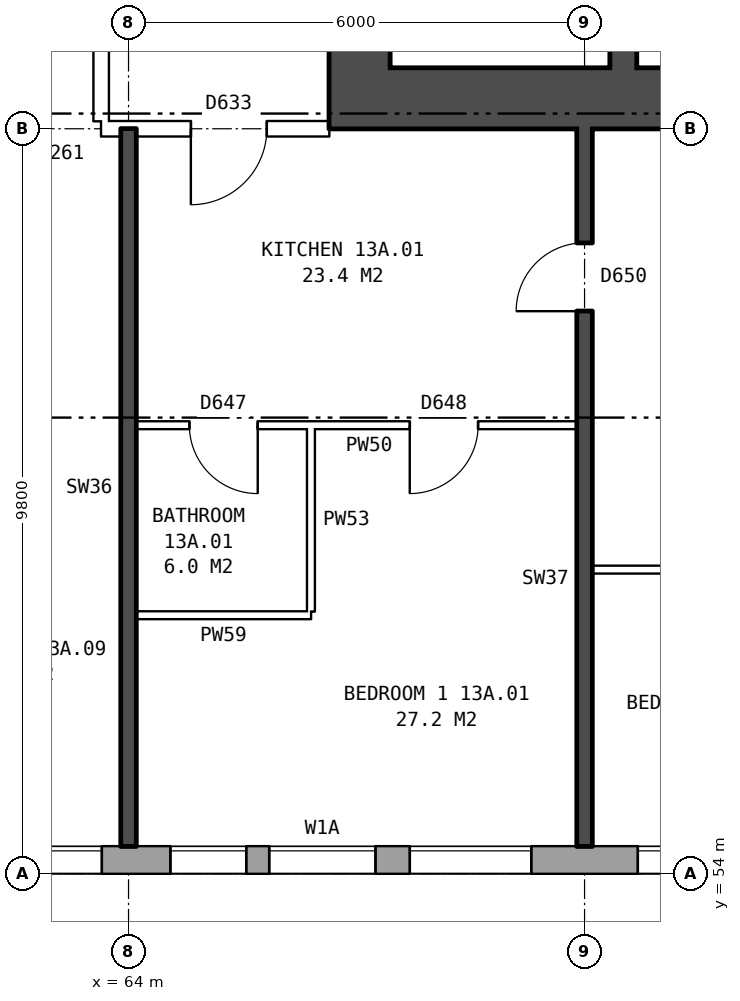
"""IFC4 building model, lengths in metres.
Left out: names, types, materials, properties, quantities, classifications, styles, units other than length and angle.
Written with IfcOpenShell. Run it as: python <this file> out.ifc"""

import sys

from ifc_helpers import new_model, si_unit, direction, frame, frame_2d, origin, place, context, subcontext, project, spatial, rectangle, extrude, element, fill, save


model = new_model("IFC4")
c1 = context("Model", 3, precision=1e-05, world=origin(), true_north=direction((0.0, 1.0)))
c2 = subcontext(c1, "Body", "Model", "MODEL_VIEW")
j1 = project(units=[si_unit("LENGTHUNIT", "METRE"), si_unit("PLANEANGLEUNIT", "RADIAN")], contexts=[c1])
p1 = place(None, origin())
s1 = spatial("IfcSite", under=j1, at=p1, CompositionType="ELEMENT")
p2 = place(p1, origin())
s2 = spatial("IfcBuilding", under=s1, at=p2, CompositionType="ELEMENT")
p3 = place(p2, frame((0.0, 0.0, 50.5)))
s3 = spatial("IfcBuildingStorey", under=s2, at=p3, CompositionType="ELEMENT", Elevation=50.5)
p4 = place(p3, frame((24.575, 54.18, 0.0), z_axis=(0.0, 0.0, 1.0), x_axis=(1.0, 0.0, 0.0)))
e1 = element("IfcWall", 1, at=p4, inside=s3, PredefinedType="STANDARD", context=c2, shape_type="SweptSolid", body=[
    extrude(rectangle(XDim=48.351, YDim=0.36, at=frame_2d((24.175, 0.0))), origin(), (0.0, 0.0, 1.0), 2.85),
])
p5 = place(p4, frame((1.125, 0.0, 0.8)))
e2 = element("IfcOpeningElement", 2, at=p5, cuts=e1, PredefinedType="OPENING", context=c2, shape_type="SweptSolid", body=[
    extrude(rectangle(XDim=1.6, YDim=1.8, at=frame_2d((0.8, 0.9))), frame((0.0, 0.19, 0.0), z_axis=(0.0, -1.0, 0.0), x_axis=(1.0, 0.0, 0.0)), (0.0, 0.0, 1.0), 0.38),
])
p6 = place(p4, frame((4.125, 0.0, 0.8)))
e3 = element("IfcOpeningElement", 3, at=p6, cuts=e1, PredefinedType="OPENING", context=c2, shape_type="SweptSolid", body=[
    extrude(rectangle(XDim=1.6, YDim=1.8, at=frame_2d((0.8, 0.9))), frame((0.0, 0.19, 0.0), z_axis=(0.0, -1.0, 0.0), x_axis=(1.0, 0.0, 0.0)), (0.0, 0.0, 1.0), 0.38),
])
p7 = place(p4, frame((6.025, 0.0, 0.8)))
e4 = element("IfcOpeningElement", 4, at=p7, cuts=e1, PredefinedType="OPENING", context=c2, shape_type="SweptSolid", body=[
    extrude(rectangle(XDim=1.0, YDim=1.8, at=frame_2d((0.5, 0.9))), frame((0.0, 0.19, 0.0), z_axis=(0.0, -1.0, 0.0), x_axis=(1.0, 0.0, 0.0)), (0.0, 0.0, 1.0), 0.38),
])
p8 = place(p4, frame((9.775, 0.0, 0.8)))
e5 = element("IfcOpeningElement", 5, at=p8, cuts=e1, PredefinedType="OPENING", context=c2, shape_type="SweptSolid", body=[
    extrude(rectangle(XDim=1.0, YDim=0.9, at=frame_2d((0.5, 0.45))), frame((0.0, 0.19, 0.0), z_axis=(0.0, -1.0, 0.0), x_axis=(1.0, 0.0, 0.0)), (0.0, 0.0, 1.0), 0.38),
])
p9 = place(p4, frame((13.125, 0.0, 0.8)))
e6 = element("IfcOpeningElement", 6, at=p9, cuts=e1, PredefinedType="OPENING", context=c2, shape_type="SweptSolid", body=[
    extrude(rectangle(XDim=1.6, YDim=1.8, at=frame_2d((0.8, 0.9))), frame((0.0, 0.19, 0.0), z_axis=(0.0, -1.0, 0.0), x_axis=(1.0, 0.0, 0.0)), (0.0, 0.0, 1.0), 0.38),
])
p10 = place(p4, frame((16.125, 0.0, 0.8)))
e7 = element("IfcOpeningElement", 7, at=p10, cuts=e1, PredefinedType="OPENING", context=c2, shape_type="SweptSolid", body=[
    extrude(rectangle(XDim=1.6, YDim=1.8, at=frame_2d((0.8, 0.9))), frame((0.0, 0.19, 0.0), z_axis=(0.0, -1.0, 0.0), x_axis=(1.0, 0.0, 0.0)), (0.0, 0.0, 1.0), 0.38),
])
p11 = place(p4, frame((19.125, 0.0, 0.8)))
e8 = element("IfcOpeningElement", 8, at=p11, cuts=e1, PredefinedType="OPENING", context=c2, shape_type="SweptSolid", body=[
    extrude(rectangle(XDim=1.6, YDim=1.8, at=frame_2d((0.8, 0.9))), frame((0.0, 0.19, 0.0), z_axis=(0.0, -1.0, 0.0), x_axis=(1.0, 0.0, 0.0)), (0.0, 0.0, 1.0), 0.38),
])
p12 = place(p4, frame((22.125, 0.0, 0.8)))
e9 = element("IfcOpeningElement", 9, at=p12, cuts=e1, PredefinedType="OPENING", context=c2, shape_type="SweptSolid", body=[
    extrude(rectangle(XDim=1.6, YDim=1.8, at=frame_2d((0.8, 0.9))), frame((0.0, 0.19, 0.0), z_axis=(0.0, -1.0, 0.0), x_axis=(1.0, 0.0, 0.0)), (0.0, 0.0, 1.0), 0.38),
])
p13 = place(p4, frame((25.125, 0.0, 0.8)))
e10 = element("IfcOpeningElement", 10, at=p13, cuts=e1, PredefinedType="OPENING", context=c2, shape_type="SweptSolid", body=[
    extrude(rectangle(XDim=1.6, YDim=1.8, at=frame_2d((0.8, 0.9))), frame((0.0, 0.19, 0.0), z_axis=(0.0, -1.0, 0.0), x_axis=(1.0, 0.0, 0.0)), (0.0, 0.0, 1.0), 0.38),
])
p14 = place(p4, frame((28.125, 0.0, 0.8)))
e11 = element("IfcOpeningElement", 11, at=p14, cuts=e1, PredefinedType="OPENING", context=c2, shape_type="SweptSolid", body=[
    extrude(rectangle(XDim=1.6, YDim=1.8, at=frame_2d((0.8, 0.9))), frame((0.0, 0.19, 0.0), z_axis=(0.0, -1.0, 0.0), x_axis=(1.0, 0.0, 0.0)), (0.0, 0.0, 1.0), 0.38),
])
p15 = place(p4, frame((31.125, 0.0, 0.8)))
e12 = element("IfcOpeningElement", 12, at=p15, cuts=e1, PredefinedType="OPENING", context=c2, shape_type="SweptSolid", body=[
    extrude(rectangle(XDim=1.6, YDim=1.8, at=frame_2d((0.8, 0.9))), frame((0.0, 0.19, 0.0), z_axis=(0.0, -1.0, 0.0), x_axis=(1.0, 0.0, 0.0)), (0.0, 0.0, 1.0), 0.38),
])
p16 = place(p4, frame((34.125, 0.0, 0.8)))
e13 = element("IfcOpeningElement", 13, at=p16, cuts=e1, PredefinedType="OPENING", context=c2, shape_type="SweptSolid", body=[
    extrude(rectangle(XDim=1.6, YDim=1.8, at=frame_2d((0.8, 0.9))), frame((0.0, 0.19, 0.0), z_axis=(0.0, -1.0, 0.0), x_axis=(1.0, 0.0, 0.0)), (0.0, 0.0, 1.0), 0.38),
])
p17 = place(p4, frame((36.575, 0.0, 0.45)))
e14 = element("IfcOpeningElement", 14, at=p17, cuts=e1, PredefinedType="OPENING", context=c2, shape_type="SweptSolid", body=[
    extrude(rectangle(XDim=1.2, YDim=1.8, at=frame_2d((0.6, 0.9))), frame((0.0, 0.19, 0.0), z_axis=(0.0, -1.0, 0.0), x_axis=(1.0, 0.0, 0.0)), (0.0, 0.0, 1.0), 0.38),
])
p18 = place(p4, frame((39.975, 0.0, 1.7)))
e15 = element("IfcOpeningElement", 15, at=p18, cuts=e1, PredefinedType="OPENING", context=c2, shape_type="SweptSolid", body=[
    extrude(rectangle(XDim=1.0, YDim=0.9, at=frame_2d((0.5, 0.45))), frame((0.0, 0.19, 0.0), z_axis=(0.0, -1.0, 0.0), x_axis=(1.0, 0.0, 0.0)), (0.0, 0.0, 1.0), 0.38),
])
p19 = place(p4, frame((43.125, 0.0, 0.8)))
e16 = element("IfcOpeningElement", 16, at=p19, cuts=e1, PredefinedType="OPENING", context=c2, shape_type="SweptSolid", body=[
    extrude(rectangle(XDim=1.6, YDim=1.8, at=frame_2d((0.8, 0.9))), frame((0.0, 0.19, 0.0), z_axis=(0.0, -1.0, 0.0), x_axis=(1.0, 0.0, 0.0)), (0.0, 0.0, 1.0), 0.38),
])
p20 = place(p4, frame((46.125, 0.0, 0.8)))
e17 = element("IfcOpeningElement", 17, at=p20, cuts=e1, PredefinedType="OPENING", context=c2, shape_type="SweptSolid", body=[
    extrude(rectangle(XDim=1.6, YDim=1.8, at=frame_2d((0.8, 0.9))), frame((0.0, 0.19, 0.0), z_axis=(0.0, -1.0, 0.0), x_axis=(1.0, 0.0, 0.0)), (0.0, 0.0, 1.0), 0.38),
])
p21 = place(p4, frame((7.325, 0.0, 1.7)))
e18 = element("IfcOpeningElement", 18, at=p21, cuts=e1, PredefinedType="OPENING", context=c2, shape_type="SweptSolid", body=[
    extrude(rectangle(XDim=1.0, YDim=0.9, at=frame_2d((0.5, 0.45))), frame((0.0, 0.19, 0.0), z_axis=(0.0, -1.0, 0.0), x_axis=(1.0, 0.0, 0.0)), (0.0, 0.0, 1.0), 0.38),
])
p22 = place(p4, frame((11.075, 0.0, 0.8)))
e19 = element("IfcOpeningElement", 19, at=p22, cuts=e1, PredefinedType="OPENING", context=c2, shape_type="SweptSolid", body=[
    extrude(rectangle(XDim=1.0, YDim=1.8, at=frame_2d((0.5, 0.9))), frame((0.0, 0.19, 0.0), z_axis=(0.0, -1.0, 0.0), x_axis=(1.0, 0.0, 0.0)), (0.0, 0.0, 1.0), 0.38),
])
p23 = place(p4, frame((38.075, 0.0, 0.45)))
e20 = element("IfcOpeningElement", 20, at=p23, cuts=e1, PredefinedType="OPENING", context=c2, shape_type="SweptSolid", body=[
    extrude(rectangle(XDim=1.0, YDim=0.9, at=frame_2d((0.5, 0.45))), frame((0.0, 0.19, 0.0), z_axis=(0.0, -1.0, 0.0), x_axis=(1.0, 0.0, 0.0)), (0.0, 0.0, 1.0), 0.38),
])
p24 = place(p4, frame((41.275, 0.0, 0.8)))
e21 = element("IfcOpeningElement", 21, at=p24, cuts=e1, PredefinedType="OPENING", context=c2, shape_type="SweptSolid", body=[
    extrude(rectangle(XDim=1.4, YDim=1.8, at=frame_2d((0.7, 0.9))), frame((0.0, 0.19, 0.0), z_axis=(0.0, -1.0, 0.0), x_axis=(1.0, 0.0, 0.0)), (0.0, 0.0, 1.0), 0.38),
])
p25 = place(p3, frame((67.04, 64.6, 0.0), z_axis=(0.0, 0.0, 1.0), x_axis=(0.0, 1.0, 0.0)))
e22 = element("IfcWall", 22, at=p25, inside=s3, PredefinedType="SHEAR", context=c2, shape_type="SweptSolid", body=[
    extrude(rectangle(XDim=10.8, YDim=0.8, at=frame_2d((5.4, 0.0))), origin(), (0.0, 0.0, 1.0), 2.85),
])
p26 = place(p25, frame((0.525, 0.0, 0.0)))
e23 = element("IfcOpeningElement", 23, at=p26, cuts=e22, PredefinedType="OPENING", context=c2, shape_type="SweptSolid", body=[
    extrude(rectangle(XDim=1.1, YDim=2.1, at=frame_2d((0.55, 1.05))), frame((0.0, 0.41, 0.0), z_axis=(0.0, -1.0, 0.0), x_axis=(1.0, 0.0, 0.0)), (0.0, 0.0, 1.0), 0.82),
])
p27 = place(p25, frame((9.1, 0.0, 0.0)))
e24 = element("IfcOpeningElement", 24, at=p27, cuts=e22, PredefinedType="OPENING", context=c2, shape_type="SweptSolid", body=[
    extrude(rectangle(XDim=1.1, YDim=2.1, at=frame_2d((0.55, 1.05))), frame((0.0, 0.41, 0.0), z_axis=(0.0, -1.0, 0.0), x_axis=(1.0, 0.0, 0.0)), (0.0, 0.0, 1.0), 0.82),
])
p28 = place(p3, frame((66.64, 64.2, 0.0), z_axis=(0.0, 0.0, 1.0), x_axis=(1.0, 0.0, 0.0)))
e25 = element("IfcWall", 25, at=p28, inside=s3, PredefinedType="SHEAR", context=c2, shape_type="SweptSolid", body=[
    extrude(rectangle(XDim=9.0, YDim=0.8, at=frame_2d((4.5, 0.0))), origin(), (0.0, 0.0, 1.0), 2.85),
])
p29 = place(p3, frame((70.51, 64.6, 0.0), z_axis=(0.0, 0.0, 1.0), x_axis=(0.0, 1.0, 0.0)))
e26 = element("IfcWall", 26, at=p29, inside=s3, PredefinedType="SHEAR", context=c2, shape_type="SweptSolid", body=[
    extrude(rectangle(XDim=2.075, YDim=0.35, at=frame_2d((1.038, 0.0))), origin(), (0.0, 0.0, 1.0), 2.85),
])
p30 = place(p3, frame((63.64, 63.9, 0.0), z_axis=(0.0, 0.0, 1.0), x_axis=(0.0, 1.0, 0.0)))
e27 = element("IfcWall", 27, at=p30, inside=s3, PredefinedType="PARTITIONING", context=c2, shape_type="SweptSolid", body=[
    extrude(rectangle(XDim=12.2, YDim=0.2, at=frame_2d((6.1, 0.0))), origin(), (0.0, 0.0, 1.0), 2.85),
])
p31 = place(p30, frame((5.1, 0.0, 0.0)))
e28 = element("IfcOpeningElement", 28, at=p31, cuts=e27, PredefinedType="OPENING", context=c2, shape_type="SweptSolid", body=[
    extrude(rectangle(XDim=2.0, YDim=2.1, at=frame_2d((1.0, 1.05))), frame((0.0, 0.11, 0.0), z_axis=(0.0, -1.0, 0.0), x_axis=(1.0, 0.0, 0.0)), (0.0, 0.0, 1.0), 0.22),
])
p32 = place(p3, frame((64.1, 57.4, 0.0), z_axis=(0.0, 0.0, 1.0), x_axis=(1.0, 0.0, 0.0)))
e29 = element("IfcWall", 29, at=p32, inside=s3, PredefinedType="PARTITIONING", context=c2, shape_type="SweptSolid", body=[
    extrude(rectangle(XDim=2.3, YDim=0.1, at=frame_2d((1.15, 0.0))), origin(), (0.0, 0.0, 1.0), 2.85),
])
p33 = place(p3, frame((70.1, 58.0, 0.0), z_axis=(0.0, 0.0, 1.0), x_axis=(1.0, 0.0, 0.0)))
e30 = element("IfcWall", 30, at=p33, inside=s3, PredefinedType="PARTITIONING", context=c2, shape_type="SweptSolid", body=[
    extrude(rectangle(XDim=5.54, YDim=0.1, at=frame_2d((2.77, 0.0))), origin(), (0.0, 0.0, 1.0), 2.85),
])
p34 = place(p33, frame((2.32, 0.0, 0.0)))
e31 = element("IfcOpeningElement", 31, at=p34, cuts=e30, PredefinedType="OPENING", context=c2, shape_type="SweptSolid", body=[
    extrude(rectangle(XDim=0.9, YDim=2.1, at=frame_2d((0.45, 1.05))), frame((0.0, 0.06, 0.0), z_axis=(0.0, -1.0, 0.0), x_axis=(1.0, 0.0, 0.0)), (0.0, 0.0, 1.0), 0.12),
])
p35 = place(p3, frame((64.1, 59.9, 0.0), z_axis=(0.0, 0.0, 1.0), x_axis=(1.0, 0.0, 0.0)))
e32 = element("IfcWall", 32, at=p35, inside=s3, PredefinedType="PARTITIONING", context=c2, shape_type="SweptSolid", body=[
    extrude(rectangle(XDim=5.8, YDim=0.1, at=frame_2d((2.9, 0.0))), origin(), (0.0, 0.0, 1.0), 2.85),
])
p36 = place(p35, frame((3.6, 0.0, 0.0)))
e33 = element("IfcOpeningElement", 33, at=p36, cuts=e32, PredefinedType="OPENING", context=c2, shape_type="SweptSolid", body=[
    extrude(rectangle(XDim=0.9, YDim=2.1, at=frame_2d((0.45, 1.05))), frame((0.0, 0.06, 0.0), z_axis=(0.0, -1.0, 0.0), x_axis=(1.0, 0.0, 0.0)), (0.0, 0.0, 1.0), 0.12),
])
p37 = place(p35, frame((0.7, 0.0, 0.0)))
e34 = element("IfcOpeningElement", 34, at=p37, cuts=e32, PredefinedType="OPENING", context=c2, shape_type="SweptSolid", body=[
    extrude(rectangle(XDim=0.9, YDim=2.1, at=frame_2d((0.45, 1.05))), frame((0.0, 0.06, 0.0), z_axis=(0.0, -1.0, 0.0), x_axis=(1.0, 0.0, 0.0)), (0.0, 0.0, 1.0), 0.12),
])
p38 = place(p3, frame((63.64, 63.8, 0.0), z_axis=(0.0, 0.0, 1.0), x_axis=(1.0, 0.0, 0.0)))
e35 = element("IfcWall", 35, at=p38, inside=s3, PredefinedType="PARTITIONING", context=c2, shape_type="SweptSolid", body=[
    extrude(rectangle(XDim=3.0, YDim=0.2, at=frame_2d((1.5, 0.0))), origin(), (0.0, 0.0, 1.0), 2.85),
])
p39 = place(p38, frame((1.18, 0.0, 0.0)))
e36 = element("IfcOpeningElement", 36, at=p39, cuts=e35, PredefinedType="OPENING", context=c2, shape_type="SweptSolid", body=[
    extrude(rectangle(XDim=1.0, YDim=2.1, at=frame_2d((0.5, 1.05))), frame((0.0, 0.11, 0.0), z_axis=(0.0, -1.0, 0.0), x_axis=(1.0, 0.0, 0.0)), (0.0, 0.0, 1.0), 0.22),
])
p40 = place(p3, frame((64.0, 54.36, 0.0), z_axis=(0.0, 0.0, 1.0), x_axis=(0.0, 1.0, 0.0)))
e37 = element("IfcWall", 37, at=p40, inside=s3, PredefinedType="SOLIDWALL", context=c2, shape_type="SweptSolid", body=[
    extrude(rectangle(XDim=9.44, YDim=0.2, at=frame_2d((4.72, 0.0))), origin(), (0.0, 0.0, 1.0), 2.85),
])
p41 = place(p3, frame((66.4, 57.45, 0.0), z_axis=(0.0, 0.0, 1.0), x_axis=(0.0, 1.0, 0.0)))
e38 = element("IfcWall", 38, at=p41, inside=s3, PredefinedType="PARTITIONING", context=c2, shape_type="SweptSolid", body=[
    extrude(rectangle(XDim=2.4, YDim=0.1, at=frame_2d((1.2, 0.0))), origin(), (0.0, 0.0, 1.0), 2.85),
])
p42 = place(p3, frame((70.0, 54.36, 0.0), z_axis=(0.0, 0.0, 1.0), x_axis=(0.0, 1.0, 0.0)))
e39 = element("IfcWall", 39, at=p42, inside=s3, PredefinedType="SOLIDWALL", context=c2, shape_type="SweptSolid", body=[
    extrude(rectangle(XDim=9.44, YDim=0.2, at=frame_2d((4.72, 0.0))), origin(), (0.0, 0.0, 1.0), 2.85),
])
p43 = place(p42, frame((7.04, 0.0, 0.0)))
e40 = element("IfcOpeningElement", 40, at=p43, cuts=e39, PredefinedType="OPENING", context=c2, shape_type="SweptSolid", body=[
    extrude(rectangle(XDim=0.9, YDim=2.1, at=frame_2d((0.45, 1.05))), frame((0.0, 0.11, 0.0), z_axis=(0.0, -1.0, 0.0), x_axis=(1.0, 0.0, 0.0)), (0.0, 0.0, 1.0), 0.22),
])
p44 = place(p18, origin())
e41 = element("IfcWindow", 41, at=p44, inside=s3, PartitioningType="SINGLE_PANEL", PredefinedType="WINDOW", context=c2, shape_type="SweptSolid", body=[
    extrude(rectangle(XDim=1.0, YDim=0.9, at=frame_2d((0.5, 0.45))), frame((0.0, 0.15, 0.0), z_axis=(0.0, -1.0, 0.0), x_axis=(1.0, 0.0, 0.0)), (0.0, 0.0, 1.0), 0.06),
])
fill(e15, e41)
p45 = place(p19, origin())
e42 = element("IfcWindow", 42, at=p45, inside=s3, PartitioningType="SINGLE_PANEL", PredefinedType="WINDOW", context=c2, shape_type="SweptSolid", body=[
    extrude(rectangle(XDim=1.6, YDim=1.8, at=frame_2d((0.8, 0.9))), frame((0.0, 0.15, 0.0), z_axis=(0.0, -1.0, 0.0), x_axis=(1.0, 0.0, 0.0)), (0.0, 0.0, 1.0), 0.06),
])
fill(e16, e42)
p46 = place(p20, origin())
e43 = element("IfcWindow", 43, at=p46, inside=s3, PartitioningType="SINGLE_PANEL", PredefinedType="WINDOW", context=c2, shape_type="SweptSolid", body=[
    extrude(rectangle(XDim=1.6, YDim=1.8, at=frame_2d((0.8, 0.9))), frame((0.0, 0.15, 0.0), z_axis=(0.0, -1.0, 0.0), x_axis=(1.0, 0.0, 0.0)), (0.0, 0.0, 1.0), 0.06),
])
fill(e17, e43)
p47 = place(p36, frame((0.9, 0.0, 0.0), z_axis=(0.0, 0.0, 1.0), x_axis=(-1.0, 0.0, 0.0)))
e44 = element("IfcDoor", 44, at=p47, inside=s3, OperationType="SINGLE_SWING_RIGHT", PredefinedType="DOOR", context=c2, shape_type="SweptSolid", body=[
    extrude(rectangle(XDim=0.9, YDim=2.1, at=frame_2d((0.45, 1.05))), frame((0.0, 0.025, 0.0), z_axis=(0.0, -1.0, 0.0), x_axis=(1.0, 0.0, 0.0)), (0.0, 0.0, 1.0), 0.05),
])
fill(e33, e44)
p48 = place(p39, frame((1.0, 0.0, 0.0), z_axis=(0.0, 0.0, 1.0), x_axis=(-1.0, 0.0, 0.0)))
e45 = element("IfcDoor", 45, at=p48, inside=s3, OperationType="SINGLE_SWING_RIGHT", PredefinedType="DOOR", context=c2, shape_type="SweptSolid", body=[
    extrude(rectangle(XDim=1.0, YDim=2.1, at=frame_2d((0.5, 1.05))), frame((0.0, 0.025, 0.0), z_axis=(0.0, -1.0, 0.0), x_axis=(1.0, 0.0, 0.0)), (0.0, 0.0, 1.0), 0.05),
])
fill(e36, e45)
p49 = place(p43, origin())
e46 = element("IfcDoor", 46, at=p49, inside=s3, OperationType="SINGLE_SWING_LEFT", PredefinedType="DOOR", context=c2, shape_type="SweptSolid", body=[
    extrude(rectangle(XDim=0.9, YDim=2.1, at=frame_2d((0.45, 1.05))), frame((0.0, 0.025, 0.0), z_axis=(0.0, -1.0, 0.0), x_axis=(1.0, 0.0, 0.0)), (0.0, 0.0, 1.0), 0.05),
])
fill(e40, e46)
p50 = place(p37, frame((0.9, 0.0, 0.0), z_axis=(0.0, 0.0, 1.0), x_axis=(-1.0, 0.0, 0.0)))
e47 = element("IfcDoor", 47, at=p50, inside=s3, OperationType="SINGLE_SWING_LEFT", PredefinedType="DOOR", context=c2, shape_type="SweptSolid", body=[
    extrude(rectangle(XDim=0.9, YDim=2.1, at=frame_2d((0.45, 1.05))), frame((0.0, 0.025, 0.0), z_axis=(0.0, -1.0, 0.0), x_axis=(1.0, 0.0, 0.0)), (0.0, 0.0, 1.0), 0.05),
])
fill(e34, e47)
p51 = place(p23, origin())
e48 = element("IfcWindow", 48, at=p51, inside=s3, PartitioningType="SINGLE_PANEL", PredefinedType="WINDOW", context=c2, shape_type="SweptSolid", body=[
    extrude(rectangle(XDim=1.0, YDim=0.9, at=frame_2d((0.5, 0.45))), frame((0.0, 0.15, 0.0), z_axis=(0.0, -1.0, 0.0), x_axis=(1.0, 0.0, 0.0)), (0.0, 0.0, 1.0), 0.06),
])
fill(e20, e48)
p52 = place(p24, origin())
e49 = element("IfcWindow", 49, at=p52, inside=s3, PartitioningType="SINGLE_PANEL", PredefinedType="WINDOW", context=c2, shape_type="SweptSolid", body=[
    extrude(rectangle(XDim=1.4, YDim=1.8, at=frame_2d((0.7, 0.9))), frame((0.0, 0.15, 0.0), z_axis=(0.0, -1.0, 0.0), x_axis=(1.0, 0.0, 0.0)), (0.0, 0.0, 1.0), 0.06),
])
fill(e21, e49)
save(model, sys.argv[1])
